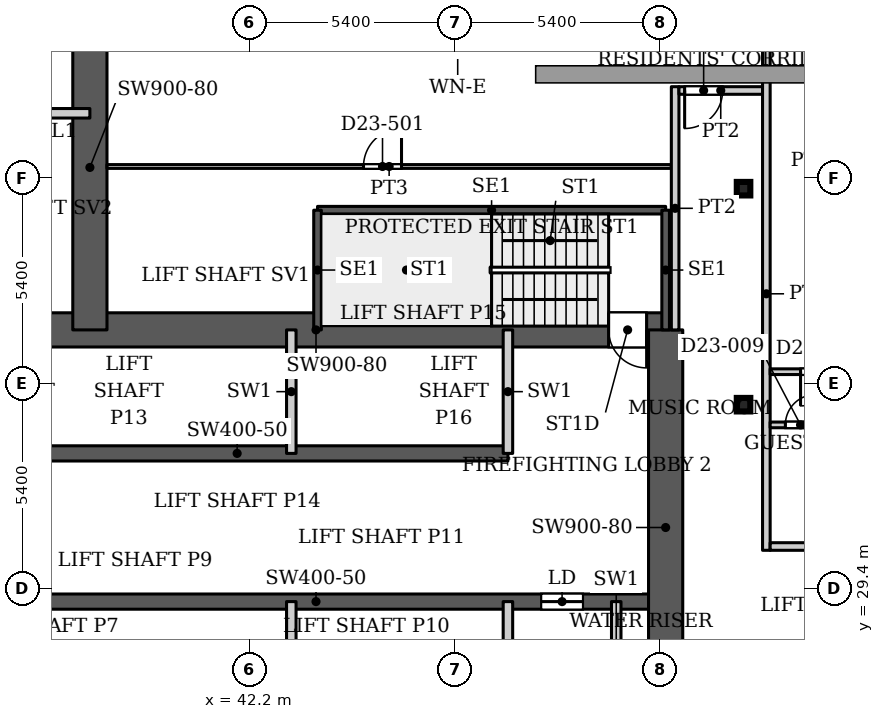
"""IFC4 building model, lengths in metres.
Left out: names, types, materials, properties, quantities, classifications, styles, units other than length and angle.
Written with IfcOpenShell. Run it as: python <this file> out.ifc"""

import sys

from ifc_helpers import new_model, si_unit, direction, frame, frame_2d, origin, origin_2d, place, context, subcontext, project, spatial, rectangle, hollow_rectangle, extrude, source, transform, mapped, element, fill, save


model = new_model("IFC4")
c1 = context("Model", 3, precision=1e-05, world=origin(), true_north=direction((0.0, 1.0)))
c2 = subcontext(c1, "Body", "Model", "MODEL_VIEW")
j1 = project(units=[si_unit("LENGTHUNIT", "METRE"), si_unit("PLANEANGLEUNIT", "RADIAN")], contexts=[c1])
p1 = place(None, origin())
s1 = spatial("IfcSite", under=j1, at=p1, CompositionType="ELEMENT")
p2 = place(p1, origin())
s2 = spatial("IfcBuilding", under=s1, at=p2, CompositionType="ELEMENT")
p3 = place(p2, frame((0.0, 0.0, 105.8)))
s3 = spatial("IfcBuildingStorey", under=s2, at=p3, CompositionType="ELEMENT", Elevation=105.8)
for number, where, z_axis, x_axis in (
    (1, (55.2, 34.232, 0.0), (0.0, 0.0, 1.0), (1.0, 0.0, 0.0)),
    (2, (55.2, 39.916, 0.0), (0.0, 0.0, 1.0), (1.0, 0.0, 0.0)),
):
    element("IfcColumn", number, at=place(p3, frame(where, z_axis=z_axis, x_axis=x_axis)), inside=s3, PredefinedType="COLUMN", context=c2, shape_type="SweptSolid", body=[
        extrude(hollow_rectangle(XDim=0.356, YDim=0.356, WallThickness=0.016, InnerFilletRadius=0.016, OuterFilletRadius=0.032, at=origin_2d()), origin(), (0.0, 0.0, 1.0), 3.9),
    ])
p4 = place(p3, frame((34.75, 29.05, 0.0), z_axis=(0.0, 0.0, 1.0), x_axis=(1.0, 0.0, 0.0)))
e3 = element("IfcWall", 3, at=p4, inside=s3, PredefinedType="SHEAR", context=c2, shape_type="SweptSolid", body=[
    extrude(rectangle(XDim=18.4, YDim=0.4, at=frame_2d((9.2, 0.0))), origin(), (0.0, 0.0, 1.0), 3.9),
])
p5 = place(p4, frame((15.125, 0.0, 0.0)))
e4 = element("IfcOpeningElement", 4, at=p5, cuts=e3, PredefinedType="OPENING", context=c2, shape_type="SweptSolid", body=[
    extrude(rectangle(XDim=1.1, YDim=2.2, at=frame_2d((0.55, 1.1))), frame((0.0, 0.21, 0.0), z_axis=(0.0, -1.0, 0.0), x_axis=(1.0, 0.0, 0.0)), (0.0, 0.0, 1.0), 0.42),
])
p6 = place(p3, frame((34.75, 32.95, 0.0), z_axis=(0.0, 0.0, 1.0), x_axis=(1.0, 0.0, 0.0)))
e5 = element("IfcWall", 5, at=p6, inside=s3, PredefinedType="SHEAR", context=c2, shape_type="SweptSolid", body=[
    extrude(rectangle(XDim=14.25, YDim=0.4, at=frame_2d((7.125, 0.0))), origin(), (0.0, 0.0, 1.0), 3.9),
])
p7 = place(p3, frame((34.75, 36.2, 0.0), z_axis=(0.0, 0.0, 1.0), x_axis=(1.0, 0.0, 0.0)))
e6 = element("IfcWall", 6, at=p7, inside=s3, PredefinedType="SHEAR", context=c2, shape_type="SweptSolid", body=[
    extrude(rectangle(XDim=18.4, YDim=0.9, at=frame_2d((9.2, 0.0))), origin(), (0.0, 0.0, 1.0), 3.9),
])
p8 = place(p7, frame((16.9, 0.0, 0.0)))
e7 = element("IfcOpeningElement", 7, at=p8, cuts=e6, PredefinedType="OPENING", context=c2, shape_type="SweptSolid", body=[
    extrude(rectangle(XDim=1.0, YDim=2.2, at=frame_2d((0.5, 1.1))), frame((0.0, 0.46, 0.0), z_axis=(0.0, -1.0, 0.0), x_axis=(1.0, 0.0, 0.0)), (0.0, 0.0, 1.0), 0.92),
])
p9 = place(p3, frame((38.0, 36.2, 0.0), z_axis=(0.0, 0.0, 1.0), x_axis=(0.0, 1.0, 0.0)))
e8 = element("IfcWall", 8, at=p9, inside=s3, PredefinedType="SHEAR", context=c2, shape_type="SweptSolid", body=[
    extrude(rectangle(XDim=8.55, YDim=0.9, at=frame_2d((4.275, 0.0))), origin(), (0.0, 0.0, 1.0), 3.9),
])
p10 = place(p3, frame((53.15, 25.8, 0.0), z_axis=(0.0, 0.0, 1.0), x_axis=(0.0, 1.0, 0.0)))
e9 = element("IfcWall", 9, at=p10, inside=s3, PredefinedType="SHEAR", context=c2, shape_type="SweptSolid", body=[
    extrude(rectangle(XDim=10.4, YDim=0.9, at=frame_2d((5.2, 0.0))), origin(), (0.0, 0.0, 1.0), 3.9),
])
p11 = place(p10, frame((1.175, 0.0, 0.0)))
e10 = element("IfcOpeningElement", 10, at=p11, cuts=e9, PredefinedType="OPENING", context=c2, shape_type="SweptSolid", body=[
    extrude(rectangle(XDim=0.9, YDim=2.2, at=frame_2d((0.45, 1.1))), frame((0.0, 0.46, 0.0), z_axis=(0.0, -1.0, 0.0), x_axis=(1.0, 0.0, 0.0)), (0.0, 0.0, 1.0), 0.92),
])
p12 = place(p3, frame((43.99, 39.35, 0.0), z_axis=(0.0, 0.0, 1.0), x_axis=(1.0, 0.0, 0.0)))
e11 = element("IfcWall", 11, at=p12, inside=s3, PredefinedType="SHEAR", context=c2, shape_type="SweptSolid", body=[
    extrude(rectangle(XDim=9.16, YDim=0.2, at=frame_2d((4.58, 0.0))), origin(), (0.0, 0.0, 1.0), 3.9),
])
for number, where, z_axis, x_axis in (
    (12, (43.99, 36.2, 0.0), (0.0, 0.0, 1.0), (0.0, 1.0, 0.0)),
    (13, (53.15, 36.2, 0.0), (0.0, 0.0, 1.0), (0.0, 1.0, 0.0)),
):
    element("IfcWall", number, at=place(p3, frame(where, z_axis=z_axis, x_axis=x_axis)), inside=s3, PredefinedType="SHEAR", context=c2, shape_type="SweptSolid", body=[
        extrude(rectangle(XDim=3.15, YDim=0.2, at=frame_2d((1.575, 0.0))), origin(), (0.0, 0.0, 1.0), 3.9),
    ])
for number, where, z_axis, x_axis in (
    (14, (43.3, 25.8, 0.0), (0.0, 0.0, 1.0), (0.0, 1.0, 0.0)),
    (15, (43.3, 32.95, 0.0), (0.0, 0.0, 1.0), (0.0, 1.0, 0.0)),
    (16, (49.0, 25.8, 0.0), (0.0, 0.0, 1.0), (0.0, 1.0, 0.0)),
    (17, (49.0, 32.95, 0.0), (0.0, 0.0, 1.0), (0.0, 1.0, 0.0)),
    (18, (51.85, 25.8, 0.0), (0.0, 0.0, 1.0), (0.0, 1.0, 0.0)),
    (19, (34.75, 41.9, 0.0), (0.0, 0.0, 1.0), (1.0, 0.0, 0.0)),
):
    element("IfcWall", number, at=place(p3, frame(where, z_axis=z_axis, x_axis=x_axis)), inside=s3, PredefinedType="PARTITIONING", context=c2, shape_type="SweptSolid", body=[
        extrude(rectangle(XDim=3.25, YDim=0.25, at=frame_2d((1.625, 0.0))), origin(), (0.0, 0.0, 1.0), 3.9),
    ])
p13 = place(p3, frame((38.449, 40.5, 0.0), z_axis=(0.0, 0.0, 1.0), x_axis=(1.0, 0.0, 0.0)))
e20 = element("IfcWall", 20, at=p13, inside=s3, PredefinedType="PARTITIONING", context=c2, shape_type="SweptSolid", body=[
    extrude(rectangle(XDim=14.851, YDim=0.1, at=frame_2d((7.426, 0.0))), origin(), (0.0, 0.0, 1.0), 3.6),
])
p14 = place(p13, frame((6.751, 0.0, 0.0)))
e21 = element("IfcOpeningElement", 21, at=p14, cuts=e20, PredefinedType="OPENING", context=c2, shape_type="SweptSolid", body=[
    extrude(rectangle(XDim=1.0, YDim=2.1, at=frame_2d((0.5, 1.05))), frame((0.0, 0.06, 0.0), z_axis=(0.0, -1.0, 0.0), x_axis=(1.0, 0.0, 0.0)), (0.0, 0.0, 1.0), 0.12),
])
p15 = place(p3, frame((53.4, 36.199, 0.0), z_axis=(0.0, 0.0, 1.0), x_axis=(0.0, 1.0, 0.0)))
e22 = element("IfcWall", 22, at=p15, inside=s3, PredefinedType="PARTITIONING", context=c2, shape_type="SweptSolid", body=[
    extrude(rectangle(XDim=6.401, YDim=0.2, at=frame_2d((3.201, 0.0))), origin(), (0.0, 0.0, 1.0), 3.6),
])
p16 = place(p3, frame((53.5, 42.5, 0.0), z_axis=(0.0, 0.0, 1.0), x_axis=(1.0, 0.0, 0.0)))
e23 = element("IfcWall", 23, at=p16, inside=s3, PredefinedType="PARTITIONING", context=c2, shape_type="SweptSolid", body=[
    extrude(rectangle(XDim=2.2, YDim=0.2, at=frame_2d((1.1, 0.0))), origin(), (0.0, 0.0, 1.0), 3.6),
])
p17 = place(p16, frame((0.15, 0.0, 0.0)))
e24 = element("IfcOpeningElement", 24, at=p17, cuts=e23, PredefinedType="OPENING", context=c2, shape_type="SweptSolid", body=[
    extrude(rectangle(XDim=1.0, YDim=2.1, at=frame_2d((0.5, 1.05))), frame((0.0, 0.11, 0.0), z_axis=(0.0, -1.0, 0.0), x_axis=(1.0, 0.0, 0.0)), (0.0, 0.0, 1.0), 0.22),
])
p18 = place(p3, frame((55.8, 30.4, 0.0), z_axis=(0.0, 0.0, 1.0), x_axis=(0.0, 1.0, 0.0)))
e25 = element("IfcWall", 25, at=p18, inside=s3, PredefinedType="PARTITIONING", context=c2, shape_type="SweptSolid", body=[
    extrude(rectangle(XDim=13.5, YDim=0.2, at=frame_2d((6.75, 0.0))), origin(), (0.0, 0.0, 1.0), 3.6),
])
p19 = place(p3, frame((55.9, 30.5, 0.0), z_axis=(0.0, 0.0, 1.0), x_axis=(1.0, 0.0, 0.0)))
e26 = element("IfcWall", 26, at=p19, inside=s3, PredefinedType="PARTITIONING", context=c2, shape_type="SweptSolid", body=[
    extrude(rectangle(XDim=42.2, YDim=0.2, at=frame_2d((21.1, 0.0))), origin(), (0.0, 0.0, 1.0), 3.6),
])
p20 = place(p19, frame((10.35, 0.0, 0.0)))
e27 = element("IfcOpeningElement", 27, at=p20, cuts=e26, PredefinedType="OPENING", context=c2, shape_type="SweptSolid", body=[
    extrude(rectangle(XDim=1.0, YDim=2.1, at=frame_2d((0.5, 1.05))), frame((0.0, 0.11, 0.0), z_axis=(0.0, -1.0, 0.0), x_axis=(1.0, 0.0, 0.0)), (0.0, 0.0, 1.0), 0.22),
])
p21 = place(p19, frame((16.65, 0.0, 0.0)))
e28 = element("IfcOpeningElement", 28, at=p21, cuts=e26, PredefinedType="OPENING", context=c2, shape_type="SweptSolid", body=[
    extrude(rectangle(XDim=1.0, YDim=2.1, at=frame_2d((0.5, 1.05))), frame((0.0, 0.11, 0.0), z_axis=(0.0, -1.0, 0.0), x_axis=(1.0, 0.0, 0.0)), (0.0, 0.0, 1.0), 0.22),
])
p22 = place(p19, frame((27.6, 0.0, 0.0)))
e29 = element("IfcOpeningElement", 29, at=p22, cuts=e26, PredefinedType="OPENING", context=c2, shape_type="SweptSolid", body=[
    extrude(rectangle(XDim=1.0, YDim=2.1, at=frame_2d((0.5, 1.05))), frame((0.0, 0.11, 0.0), z_axis=(0.0, -1.0, 0.0), x_axis=(1.0, 0.0, 0.0)), (0.0, 0.0, 1.0), 0.22),
])
p23 = place(p19, frame((36.0, 0.0, 0.0)))
e30 = element("IfcOpeningElement", 30, at=p23, cuts=e26, PredefinedType="OPENING", context=c2, shape_type="SweptSolid", body=[
    extrude(rectangle(XDim=1.0, YDim=2.1, at=frame_2d((0.5, 1.05))), frame((0.0, 0.11, 0.0), z_axis=(0.0, -1.0, 0.0), x_axis=(1.0, 0.0, 0.0)), (0.0, 0.0, 1.0), 0.22),
])
p24 = place(p3, frame((55.9, 33.7, 0.0), z_axis=(0.0, 0.0, 1.0), x_axis=(1.0, 0.0, 0.0)))
e31 = element("IfcWall", 31, at=p24, inside=s3, PredefinedType="PARTITIONING", context=c2, shape_type="SweptSolid", body=[
    extrude(rectangle(XDim=9.875, YDim=0.15, at=frame_2d((4.938, 0.0))), origin(), (0.0, 0.0, 1.0), 3.6),
])
p25 = place(p24, frame((2.5, 0.0, 0.0)))
e32 = element("IfcOpeningElement", 32, at=p25, cuts=e31, PredefinedType="OPENING", context=c2, shape_type="SweptSolid", body=[
    extrude(rectangle(XDim=0.8, YDim=2.1, at=frame_2d((0.4, 1.05))), frame((0.0, 0.085, 0.0), z_axis=(0.0, -1.0, 0.0), x_axis=(1.0, 0.0, 0.0)), (0.0, 0.0, 1.0), 0.17),
])
p26 = place(p24, frame((5.45, 0.0, 0.0)))
e33 = element("IfcOpeningElement", 33, at=p26, cuts=e31, PredefinedType="OPENING", context=c2, shape_type="SweptSolid", body=[
    extrude(rectangle(XDim=0.9, YDim=2.1, at=frame_2d((0.45, 1.05))), frame((0.0, 0.085, 0.0), z_axis=(0.0, -1.0, 0.0), x_axis=(1.0, 0.0, 0.0)), (0.0, 0.0, 1.0), 0.17),
])
p27 = place(p24, frame((8.35, 0.0, 0.0)))
e34 = element("IfcOpeningElement", 34, at=p27, cuts=e31, PredefinedType="OPENING", context=c2, shape_type="SweptSolid", body=[
    extrude(rectangle(XDim=0.8, YDim=2.1, at=frame_2d((0.4, 1.05))), frame((0.0, 0.085, 0.0), z_axis=(0.0, -1.0, 0.0), x_axis=(1.0, 0.0, 0.0)), (0.0, 0.0, 1.0), 0.17),
])
p28 = place(p24, frame((0.4, 0.0, 0.0)))
e35 = element("IfcOpeningElement", 35, at=p28, cuts=e31, PredefinedType="OPENING", context=c2, shape_type="SweptSolid", body=[
    extrude(rectangle(XDim=0.8, YDim=2.1, at=frame_2d((0.4, 1.05))), frame((0.0, 0.085, 0.0), z_axis=(0.0, -1.0, 0.0), x_axis=(1.0, 0.0, 0.0)), (0.0, 0.0, 1.0), 0.17),
])
p29 = place(p3, frame((55.9, 35.1, 0.0), z_axis=(0.0, 0.0, 1.0), x_axis=(1.0, 0.0, 0.0)))
e36 = element("IfcWall", 36, at=p29, inside=s3, PredefinedType="PARTITIONING", context=c2, shape_type="SweptSolid", body=[
    extrude(rectangle(XDim=11.8, YDim=0.15, at=frame_2d((5.9, 0.0))), origin(), (0.0, 0.0, 1.0), 3.6),
])
p30 = place(p29, frame((0.8, 0.0, 0.0)))
e37 = element("IfcOpeningElement", 37, at=p30, cuts=e36, PredefinedType="OPENING", context=c2, shape_type="SweptSolid", body=[
    extrude(rectangle(XDim=0.9, YDim=2.1, at=frame_2d((0.45, 1.05))), frame((0.0, 0.085, 0.0), z_axis=(0.0, -1.0, 0.0), x_axis=(1.0, 0.0, 0.0)), (0.0, 0.0, 1.0), 0.17),
])
p31 = place(p29, frame((4.5, 0.0, 0.0)))
e38 = element("IfcOpeningElement", 38, at=p31, cuts=e36, PredefinedType="OPENING", context=c2, shape_type="SweptSolid", body=[
    extrude(rectangle(XDim=1.0, YDim=2.1, at=frame_2d((0.5, 1.05))), frame((0.0, 0.085, 0.0), z_axis=(0.0, -1.0, 0.0), x_axis=(1.0, 0.0, 0.0)), (0.0, 0.0, 1.0), 0.17),
])
p32 = place(p29, frame((10.25, 0.0, 0.0)))
e39 = element("IfcOpeningElement", 39, at=p32, cuts=e36, PredefinedType="OPENING", context=c2, shape_type="SweptSolid", body=[
    extrude(rectangle(XDim=0.9, YDim=2.1, at=frame_2d((0.45, 1.05))), frame((0.0, 0.085, 0.0), z_axis=(0.0, -1.0, 0.0), x_axis=(1.0, 0.0, 0.0)), (0.0, 0.0, 1.0), 0.17),
])
m1 = source(origin(), c2, "Body", "SweptSolid", [
    extrude(rectangle(XDim=1.1, YDim=2.2, at=frame_2d((0.55, 1.1))), frame((0.0, 0.025, 0.0), z_axis=(0.0, -1.0, 0.0), x_axis=(1.0, 0.0, 0.0)), (0.0, 0.0, 1.0), 0.05),
])
p33 = place(p5, origin())
e40 = element("IfcDoor", 40, at=p33, inside=s3, OperationType="SLIDING_TO_LEFT", PredefinedType="DOOR", context=c2, shape_type="MappedRepresentation", body=[
    mapped(m1, transform((0.0, 0.0, 0.0), x_axis=(1.0, 0.0, 0.0), y_axis=(0.0, 1.0, 0.0), z_axis=(0.0, 0.0, 1.0), scale=1.0)),
])
fill(e4, e40)
m2 = source(origin(), c2, "Body", "SweptSolid", [
    extrude(rectangle(XDim=1.0, YDim=2.2, at=frame_2d((0.5, 1.1))), frame((0.0, 0.025, 0.0), z_axis=(0.0, -1.0, 0.0), x_axis=(1.0, 0.0, 0.0)), (0.0, 0.0, 1.0), 0.05),
])
p34 = place(p8, origin())
e41 = element("IfcDoor", 41, at=p34, inside=s3, OperationType="SINGLE_SWING_RIGHT", PredefinedType="DOOR", context=c2, shape_type="MappedRepresentation", body=[
    mapped(m2, transform((0.0, 0.0, 0.0), x_axis=(1.0, 0.0, 0.0), y_axis=(0.0, 1.0, 0.0), z_axis=(0.0, 0.0, 1.0), scale=1.0)),
])
fill(e7, e41)
m3 = source(origin(), c2, "Body", "SweptSolid", [
    extrude(rectangle(XDim=0.9, YDim=2.1, at=frame_2d((0.45, 1.05))), frame((0.0, 0.025, 0.0), z_axis=(0.0, -1.0, 0.0), x_axis=(1.0, 0.0, 0.0)), (0.0, 0.0, 1.0), 0.05),
])
p35 = place(p30, origin())
e42 = element("IfcDoor", 42, at=p35, inside=s3, OperationType="SINGLE_SWING_RIGHT", PredefinedType="DOOR", context=c2, shape_type="MappedRepresentation", body=[
    mapped(m3, transform((0.0, 0.0, 0.0), x_axis=(1.0, 0.0, 0.0), y_axis=(0.0, 1.0, 0.0), z_axis=(0.0, 0.0, 1.0), scale=1.0)),
])
fill(e37, e42)
m4 = source(origin(), c2, "Body", "SweptSolid", [
    extrude(rectangle(XDim=0.8, YDim=2.1, at=frame_2d((0.4, 1.05))), frame((0.0, 0.025, 0.0), z_axis=(0.0, -1.0, 0.0), x_axis=(1.0, 0.0, 0.0)), (0.0, 0.0, 1.0), 0.05),
])
p36 = place(p28, origin())
e43 = element("IfcDoor", 43, at=p36, inside=s3, OperationType="SINGLE_SWING_LEFT", PredefinedType="DOOR", context=c2, shape_type="MappedRepresentation", body=[
    mapped(m4, transform((0.0, 0.0, 0.0), x_axis=(1.0, 0.0, 0.0), y_axis=(0.0, 1.0, 0.0), z_axis=(0.0, 0.0, 1.0), scale=1.0)),
])
fill(e35, e43)
m5 = source(origin(), c2, "Body", "SweptSolid", [
    extrude(rectangle(XDim=1.0, YDim=2.1, at=frame_2d((0.5, 1.05))), frame((0.0, 0.025, 0.0), z_axis=(0.0, -1.0, 0.0), x_axis=(1.0, 0.0, 0.0)), (0.0, 0.0, 1.0), 0.05),
])
p37 = place(p14, origin())
e44 = element("IfcDoor", 44, at=p37, inside=s3, OperationType="SINGLE_SWING_LEFT", PredefinedType="DOOR", context=c2, shape_type="MappedRepresentation", body=[
    mapped(m5, transform((0.0, 0.0, 0.0), x_axis=(1.0, 0.0, 0.0), y_axis=(0.0, 1.0, 0.0), z_axis=(0.0, 0.0, 1.0), scale=1.0)),
])
fill(e21, e44)
m6 = source(origin(), c2, "Body", "SweptSolid", [
    extrude(rectangle(XDim=1.0, YDim=2.1, at=frame_2d((0.5, 1.05))), frame((0.0, 0.025, 0.0), z_axis=(0.0, -1.0, 0.0), x_axis=(1.0, 0.0, 0.0)), (0.0, 0.0, 1.0), 0.05),
])
p38 = place(p17, origin())
e45 = element("IfcDoor", 45, at=p38, inside=s3, OperationType="SINGLE_SWING_RIGHT", PredefinedType="DOOR", context=c2, shape_type="MappedRepresentation", body=[
    mapped(m6, transform((0.0, 0.0, 0.0), x_axis=(1.0, 0.0, 0.0), y_axis=(0.0, 1.0, 0.0), z_axis=(0.0, 0.0, 1.0), scale=1.0)),
])
fill(e24, e45)
save(model, sys.argv[1])
